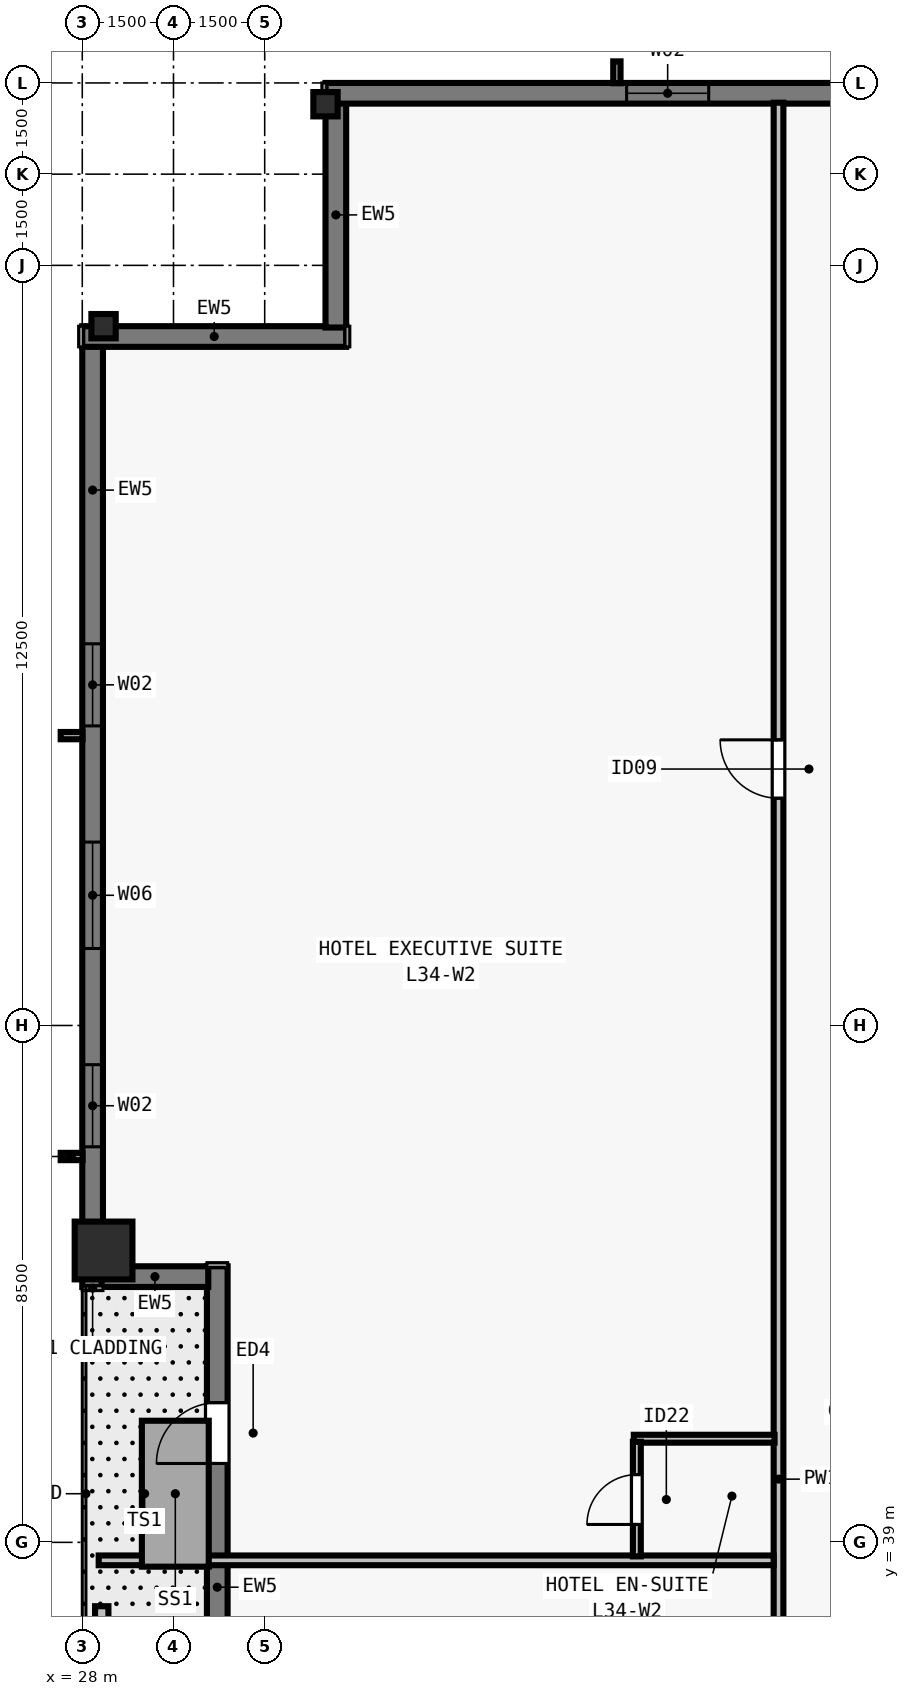
"""IFC4 building model, lengths in metres.
Left out: names, types, materials, properties, quantities, classifications, styles, units other than length and angle.
Written with IfcOpenShell. Run it as: python <this file> out.ifc"""

import sys

from ifc_helpers import new_model, si_unit, direction, frame, frame_2d, origin, origin_2d, place, context, subcontext, project, spatial, rectangle, i_section, extrude, element, fill, save


model = new_model("IFC4")
c1 = context("Model", 3, precision=1e-05, world=origin(), true_north=direction((0.0, 1.0)))
c2 = subcontext(c1, "Body", "Model", "MODEL_VIEW")
j1 = project(units=[si_unit("LENGTHUNIT", "METRE"), si_unit("PLANEANGLEUNIT", "RADIAN")], contexts=[c1])
p1 = place(None, origin())
s1 = spatial("IfcSite", under=j1, at=p1, CompositionType="ELEMENT")
p2 = place(p1, origin())
s2 = spatial("IfcBuilding", under=s1, at=p2, CompositionType="ELEMENT")
p3 = place(p2, frame((0.0, 0.0, 127.0)))
s3 = spatial("IfcBuildingStorey", under=s2, at=p3, CompositionType="ELEMENT", Elevation=127.0)
for number, where, z_axis, x_axis in (
    (1, (32.0, 62.65, 0.0), (0.0, 0.0, 1.0), (1.0, 0.0, 0.0)),
    (2, (28.35, 59.0, 0.0), (0.0, 0.0, 1.0), (0.0, 1.0, 0.0)),
):
    element("IfcColumn", number, at=place(p3, frame(where, z_axis=z_axis, x_axis=x_axis)), inside=s3, PredefinedType="COLUMN", context=c2, shape_type="SweptSolid", body=[
        extrude(i_section(OverallWidth=0.4, OverallDepth=0.4, WebThickness=0.022, FlangeThickness=0.036, at=origin_2d()), origin(), (0.0, 0.0, 1.0), 3.5),
    ])
p4 = place(p3, frame((28.35, 43.8, 0.0), z_axis=(0.0, 0.0, 1.0), x_axis=(0.0, 1.0, 0.0)))
e3 = element("IfcColumn", 3, at=p4, inside=s3, PredefinedType="COLUMN", context=c2, shape_type="SweptSolid", body=[
    extrude(rectangle(XDim=0.95, YDim=0.95, at=origin_2d()), origin(), (0.0, 0.0, 1.0), 3.5),
])
p5 = place(p3, frame((28.17, 43.2, 0.0), z_axis=(0.0, 0.0, 1.0), x_axis=(0.0, 1.0, 0.0)))
e4 = element("IfcWall", 4, at=p5, inside=s3, PredefinedType="SOLIDWALL", context=c2, shape_type="SweptSolid", body=[
    extrude(rectangle(XDim=15.482, YDim=0.34, at=frame_2d((7.741, 0.0))), origin(), (0.0, 0.0, 1.0), 3.28),
])
p6 = place(p5, frame((2.305, 0.0, 0.8)))
e5 = element("IfcOpeningElement", 5, at=p6, cuts=e4, PredefinedType="OPENING", context=c2, shape_type="SweptSolid", body=[
    extrude(rectangle(XDim=1.35, YDim=1.66, at=frame_2d((0.675, 0.83))), frame((0.0, 0.18, 0.0), z_axis=(0.0, -1.0, 0.0), x_axis=(1.0, 0.0, 0.0)), (0.0, 0.0, 1.0), 0.36),
])
p7 = place(p5, frame((5.566, 0.0, 0.8)))
e6 = element("IfcOpeningElement", 6, at=p7, cuts=e4, PredefinedType="OPENING", context=c2, shape_type="SweptSolid", body=[
    extrude(rectangle(XDim=1.75, YDim=1.66, at=frame_2d((0.875, 0.83))), frame((0.0, 0.18, 0.0), z_axis=(0.0, -1.0, 0.0), x_axis=(1.0, 0.0, 0.0)), (0.0, 0.0, 1.0), 0.36),
])
p8 = place(p5, frame((9.227, 0.0, 0.8)))
e7 = element("IfcOpeningElement", 7, at=p8, cuts=e4, PredefinedType="OPENING", context=c2, shape_type="SweptSolid", body=[
    extrude(rectangle(XDim=1.35, YDim=1.66, at=frame_2d((0.675, 0.83))), frame((0.0, 0.18, 0.0), z_axis=(0.0, -1.0, 0.0), x_axis=(1.0, 0.0, 0.0)), (0.0, 0.0, 1.0), 0.36),
])
p9 = place(p3, frame((28.0, 58.83, 0.0), z_axis=(0.0, 0.0, 1.0), x_axis=(1.0, 0.0, 0.0)))
e8 = element("IfcWall", 8, at=p9, inside=s3, PredefinedType="SOLIDWALL", context=c2, shape_type="SweptSolid", body=[
    extrude(rectangle(XDim=4.34, YDim=0.34, at=frame_2d((2.17, 0.0))), origin(), (0.0, 0.0, 1.0), 3.28),
])
p10 = place(p3, frame((32.17, 58.978, 0.0), z_axis=(0.0, 0.0, 1.0), x_axis=(0.0, 1.0, 0.0)))
e9 = element("IfcWall", 9, at=p10, inside=s3, PredefinedType="SOLIDWALL", context=c2, shape_type="SweptSolid", body=[
    extrude(rectangle(XDim=3.704, YDim=0.34, at=frame_2d((1.852, 0.0))), origin(), (0.0, 0.0, 1.0), 3.28),
])
p11 = place(p3, frame((32.0, 62.83, 0.0), z_axis=(0.0, 0.0, 1.0), x_axis=(1.0, 0.0, 0.0)))
e10 = element("IfcWall", 10, at=p11, inside=s3, PredefinedType="SOLIDWALL", context=c2, shape_type="SweptSolid", body=[
    extrude(rectangle(XDim=39.682, YDim=0.34, at=frame_2d((19.841, 0.0))), origin(), (0.0, 0.0, 1.0), 3.28),
])
p12 = place(p11, frame((4.952, 0.0, 0.8)))
e11 = element("IfcOpeningElement", 11, at=p12, cuts=e10, PredefinedType="OPENING", context=c2, shape_type="SweptSolid", body=[
    extrude(rectangle(XDim=1.35, YDim=1.66, at=frame_2d((0.675, 0.83))), frame((0.0, 0.18, 0.0), z_axis=(0.0, -1.0, 0.0), x_axis=(1.0, 0.0, 0.0)), (0.0, 0.0, 1.0), 0.36),
])
p13 = place(p11, frame((12.059, 0.0, 0.8)))
e12 = element("IfcOpeningElement", 12, at=p13, cuts=e10, PredefinedType="OPENING", context=c2, shape_type="SweptSolid", body=[
    extrude(rectangle(XDim=1.35, YDim=1.66, at=frame_2d((0.675, 0.83))), frame((0.0, 0.18, 0.0), z_axis=(0.0, -1.0, 0.0), x_axis=(1.0, 0.0, 0.0)), (0.0, 0.0, 1.0), 0.36),
])
p14 = place(p11, frame((16.262, 0.0, 0.8)))
e13 = element("IfcOpeningElement", 13, at=p14, cuts=e10, PredefinedType="OPENING", context=c2, shape_type="SweptSolid", body=[
    extrude(rectangle(XDim=1.75, YDim=1.66, at=frame_2d((0.875, 0.83))), frame((0.0, 0.18, 0.0), z_axis=(0.0, -1.0, 0.0), x_axis=(1.0, 0.0, 0.0)), (0.0, 0.0, 1.0), 0.36),
])
p15 = place(p11, frame((19.166, 0.0, 0.8)))
e14 = element("IfcOpeningElement", 14, at=p15, cuts=e10, PredefinedType="OPENING", context=c2, shape_type="SweptSolid", body=[
    extrude(rectangle(XDim=1.35, YDim=1.66, at=frame_2d((0.675, 0.83))), frame((0.0, 0.18, 0.0), z_axis=(0.0, -1.0, 0.0), x_axis=(1.0, 0.0, 0.0)), (0.0, 0.0, 1.0), 0.36),
])
p16 = place(p11, frame((22.07, 0.0, 0.8)))
e15 = element("IfcOpeningElement", 15, at=p16, cuts=e10, PredefinedType="OPENING", context=c2, shape_type="SweptSolid", body=[
    extrude(rectangle(XDim=1.75, YDim=1.66, at=frame_2d((0.875, 0.83))), frame((0.0, 0.18, 0.0), z_axis=(0.0, -1.0, 0.0), x_axis=(1.0, 0.0, 0.0)), (0.0, 0.0, 1.0), 0.36),
])
p17 = place(p11, frame((26.273, 0.0, 0.8)))
e16 = element("IfcOpeningElement", 16, at=p17, cuts=e10, PredefinedType="OPENING", context=c2, shape_type="SweptSolid", body=[
    extrude(rectangle(XDim=1.35, YDim=1.66, at=frame_2d((0.675, 0.83))), frame((0.0, 0.18, 0.0), z_axis=(0.0, -1.0, 0.0), x_axis=(1.0, 0.0, 0.0)), (0.0, 0.0, 1.0), 0.36),
])
p18 = place(p11, frame((29.627, 0.0, 0.8)))
e17 = element("IfcOpeningElement", 17, at=p18, cuts=e10, PredefinedType="OPENING", context=c2, shape_type="SweptSolid", body=[
    extrude(rectangle(XDim=1.75, YDim=1.66, at=frame_2d((0.875, 0.83))), frame((0.0, 0.18, 0.0), z_axis=(0.0, -1.0, 0.0), x_axis=(1.0, 0.0, 0.0)), (0.0, 0.0, 1.0), 0.36),
])
p19 = place(p11, frame((34.23, 0.0, 0.8)))
e18 = element("IfcOpeningElement", 18, at=p19, cuts=e10, PredefinedType="OPENING", context=c2, shape_type="SweptSolid", body=[
    extrude(rectangle(XDim=1.35, YDim=1.66, at=frame_2d((0.675, 0.83))), frame((0.0, 0.18, 0.0), z_axis=(0.0, -1.0, 0.0), x_axis=(1.0, 0.0, 0.0)), (0.0, 0.0, 1.0), 0.36),
])
p20 = place(p3, frame((30.22, 36.378, 0.0), z_axis=(0.0, 0.0, 1.0), x_axis=(0.0, 1.0, 0.0)))
e19 = element("IfcWall", 19, at=p20, inside=s3, PredefinedType="SOLIDWALL", context=c2, shape_type="SweptSolid", body=[
    extrude(rectangle(XDim=7.162, YDim=0.34, at=frame_2d((3.581, 0.0))), origin(), (0.0, 0.0, 1.0), 3.28),
])
p21 = place(p20, frame((3.919, 0.0, 0.0)))
e20 = element("IfcOpeningElement", 20, at=p21, cuts=e19, PredefinedType="OPENING", context=c2, shape_type="SweptSolid", body=[
    extrude(rectangle(XDim=1.0, YDim=2.15, at=frame_2d((0.5, 1.075))), frame((0.0, 0.18, 0.0), z_axis=(0.0, -1.0, 0.0), x_axis=(1.0, 0.0, 0.0)), (0.0, 0.0, 1.0), 0.36),
])
p22 = place(p3, frame((30.072, 43.37, 0.0), z_axis=(0.0, 0.0, 1.0), x_axis=(-1.0, 0.0, 0.0)))
e21 = element("IfcWall", 21, at=p22, inside=s3, PredefinedType="SOLIDWALL", context=c2, shape_type="SweptSolid", body=[
    extrude(rectangle(XDim=1.754, YDim=0.34, at=frame_2d((0.877, 0.0))), origin(), (0.0, 0.0, 1.0), 3.28),
])
p23 = place(p3, frame((28.32, 36.65, 0.0), z_axis=(0.0, 0.0, 1.0), x_axis=(0.0, 1.0, 0.0)))
e22 = element("IfcWall", 22, at=p23, inside=s3, PredefinedType="PARAPET", context=c2, shape_type="SweptSolid", body=[
    extrude(rectangle(XDim=1.3, YDim=0.22, at=frame_2d((0.65, 0.0))), origin(), (0.0, 0.0, 1.0), 0.55),
])
p24 = place(p3, frame((39.45, 15.325, 0.0), z_axis=(0.0, 0.0, 1.0), x_axis=(0.0, 1.0, 0.0)))
e23 = element("IfcWall", 23, at=p24, inside=s3, PredefinedType="PARTITIONING", context=c2, shape_type="SweptSolid", body=[
    extrude(rectangle(XDim=47.35, YDim=0.16, at=frame_2d((23.675, 0.0))), origin(), (0.0, 0.0, 1.0), 2.555),
])
p25 = place(p24, frame((12.557, 0.0, 0.0)))
e24 = element("IfcOpeningElement", 24, at=p25, cuts=e23, PredefinedType="OPENING", context=c2, shape_type="SweptSolid", body=[
    extrude(rectangle(XDim=0.96, YDim=2.15, at=frame_2d((0.48, 1.075))), frame((0.0, 0.09, 0.0), z_axis=(0.0, -1.0, 0.0), x_axis=(1.0, 0.0, 0.0)), (0.0, 0.0, 1.0), 0.18),
])
p26 = place(p24, frame((35.912, 0.0, 0.0)))
e25 = element("IfcOpeningElement", 25, at=p26, cuts=e23, PredefinedType="OPENING", context=c2, shape_type="SweptSolid", body=[
    extrude(rectangle(XDim=0.96, YDim=2.15, at=frame_2d((0.48, 1.075))), frame((0.0, 0.09, 0.0), z_axis=(0.0, -1.0, 0.0), x_axis=(1.0, 0.0, 0.0)), (0.0, 0.0, 1.0), 0.18),
])
p27 = place(p3, frame((28.27, 38.704, 0.0), z_axis=(0.0, 0.0, 1.0), x_axis=(1.0, 0.0, 0.0)))
e26 = element("IfcWall", 26, at=p27, inside=s3, PredefinedType="PARTITIONING", context=c2, shape_type="SweptSolid", body=[
    extrude(rectangle(XDim=11.1, YDim=0.16, at=frame_2d((5.55, 0.0))), origin(), (0.0, 0.0, 1.0), 2.896),
])
p28 = place(p3, frame((37.07, 40.704, 0.0), z_axis=(0.0, 0.0, 1.0), x_axis=(1.0, 0.0, 0.0)))
e27 = element("IfcWall", 27, at=p28, inside=s3, PredefinedType="PLUMBINGWALL", context=c2, shape_type="SweptSolid", body=[
    extrude(rectangle(XDim=2.315, YDim=0.13, at=frame_2d((1.157, 0.0))), origin(), (0.0, 0.0, 1.0), 3.28),
])
p29 = place(p3, frame((37.12, 38.769, 0.0), z_axis=(0.0, 0.0, 1.0), x_axis=(0.0, 1.0, 0.0)))
e28 = element("IfcWall", 28, at=p29, inside=s3, PredefinedType="PLUMBINGWALL", context=c2, shape_type="SweptSolid", body=[
    extrude(rectangle(XDim=1.885, YDim=0.13, at=frame_2d((0.942, 0.0))), origin(), (0.0, 0.0, 1.0), 3.28),
])
p30 = place(p29, frame((0.525, 0.0, 0.0)))
e29 = element("IfcOpeningElement", 29, at=p30, cuts=e28, PredefinedType="OPENING", context=c2, shape_type="SweptSolid", body=[
    extrude(rectangle(XDim=0.82, YDim=2.1, at=frame_2d((0.41, 1.05))), frame((0.0, 0.075, 0.0), z_axis=(0.0, -1.0, 0.0), x_axis=(1.0, 0.0, 0.0)), (0.0, 0.0, 1.0), 0.15),
])
p31 = place(p6, origin())
e30 = element("IfcWindow", 30, at=p31, inside=s3, PartitioningType="SINGLE_PANEL", PredefinedType="WINDOW", context=c2, shape_type="SweptSolid", body=[
    extrude(rectangle(XDim=1.35, YDim=1.66, at=frame_2d((0.675, 0.83))), frame((0.0, -0.05, 0.0), z_axis=(0.0, -1.0, 0.0), x_axis=(1.0, 0.0, 0.0)), (0.0, 0.0, 1.0), 0.06),
])
fill(e5, e30)
p32 = place(p7, origin())
e31 = element("IfcWindow", 31, at=p32, inside=s3, PartitioningType="SINGLE_PANEL", PredefinedType="WINDOW", context=c2, shape_type="SweptSolid", body=[
    extrude(rectangle(XDim=1.75, YDim=1.66, at=frame_2d((0.875, 0.83))), frame((0.0, -0.05, 0.0), z_axis=(0.0, -1.0, 0.0), x_axis=(1.0, 0.0, 0.0)), (0.0, 0.0, 1.0), 0.06),
])
fill(e6, e31)
p33 = place(p8, origin())
e32 = element("IfcWindow", 32, at=p33, inside=s3, PartitioningType="SINGLE_PANEL", PredefinedType="WINDOW", context=c2, shape_type="SweptSolid", body=[
    extrude(rectangle(XDim=1.35, YDim=1.66, at=frame_2d((0.675, 0.83))), frame((0.0, -0.05, 0.0), z_axis=(0.0, -1.0, 0.0), x_axis=(1.0, 0.0, 0.0)), (0.0, 0.0, 1.0), 0.06),
])
fill(e7, e32)
p34 = place(p12, origin())
e33 = element("IfcWindow", 33, at=p34, inside=s3, PartitioningType="SINGLE_PANEL", PredefinedType="WINDOW", context=c2, shape_type="SweptSolid", body=[
    extrude(rectangle(XDim=1.35, YDim=1.66, at=frame_2d((0.675, 0.83))), frame((0.0, -0.05, 0.0), z_axis=(0.0, -1.0, 0.0), x_axis=(1.0, 0.0, 0.0)), (0.0, 0.0, 1.0), 0.06),
])
fill(e11, e33)
p35 = place(p21, origin())
e34 = element("IfcDoor", 34, at=p35, inside=s3, OperationType="SINGLE_SWING_LEFT", PredefinedType="DOOR", context=c2, shape_type="SweptSolid", body=[
    extrude(rectangle(XDim=1.0, YDim=2.15, at=frame_2d((0.5, 1.075))), frame((0.0, 0.025, 0.0), z_axis=(0.0, -1.0, 0.0), x_axis=(1.0, 0.0, 0.0)), (0.0, 0.0, 1.0), 0.05),
])
fill(e20, e34)
p36 = place(p30, origin())
e35 = element("IfcDoor", 35, at=p36, inside=s3, OperationType="SINGLE_SWING_LEFT", PredefinedType="DOOR", context=c2, shape_type="SweptSolid", body=[
    extrude(rectangle(XDim=0.82, YDim=2.1, at=frame_2d((0.41, 1.05))), frame((0.0, 0.025, 0.0), z_axis=(0.0, -1.0, 0.0), x_axis=(1.0, 0.0, 0.0)), (0.0, 0.0, 1.0), 0.05),
])
fill(e29, e35)
p37 = place(p26, origin())
e36 = element("IfcDoor", 36, at=p37, inside=s3, OperationType="SINGLE_SWING_RIGHT", PredefinedType="DOOR", context=c2, shape_type="SweptSolid", body=[
    extrude(rectangle(XDim=0.96, YDim=2.15, at=frame_2d((0.48, 1.075))), frame((0.0, 0.025, 0.0), z_axis=(0.0, -1.0, 0.0), x_axis=(1.0, 0.0, 0.0)), (0.0, 0.0, 1.0), 0.05),
])
fill(e25, e36)
save(model, sys.argv[1])
